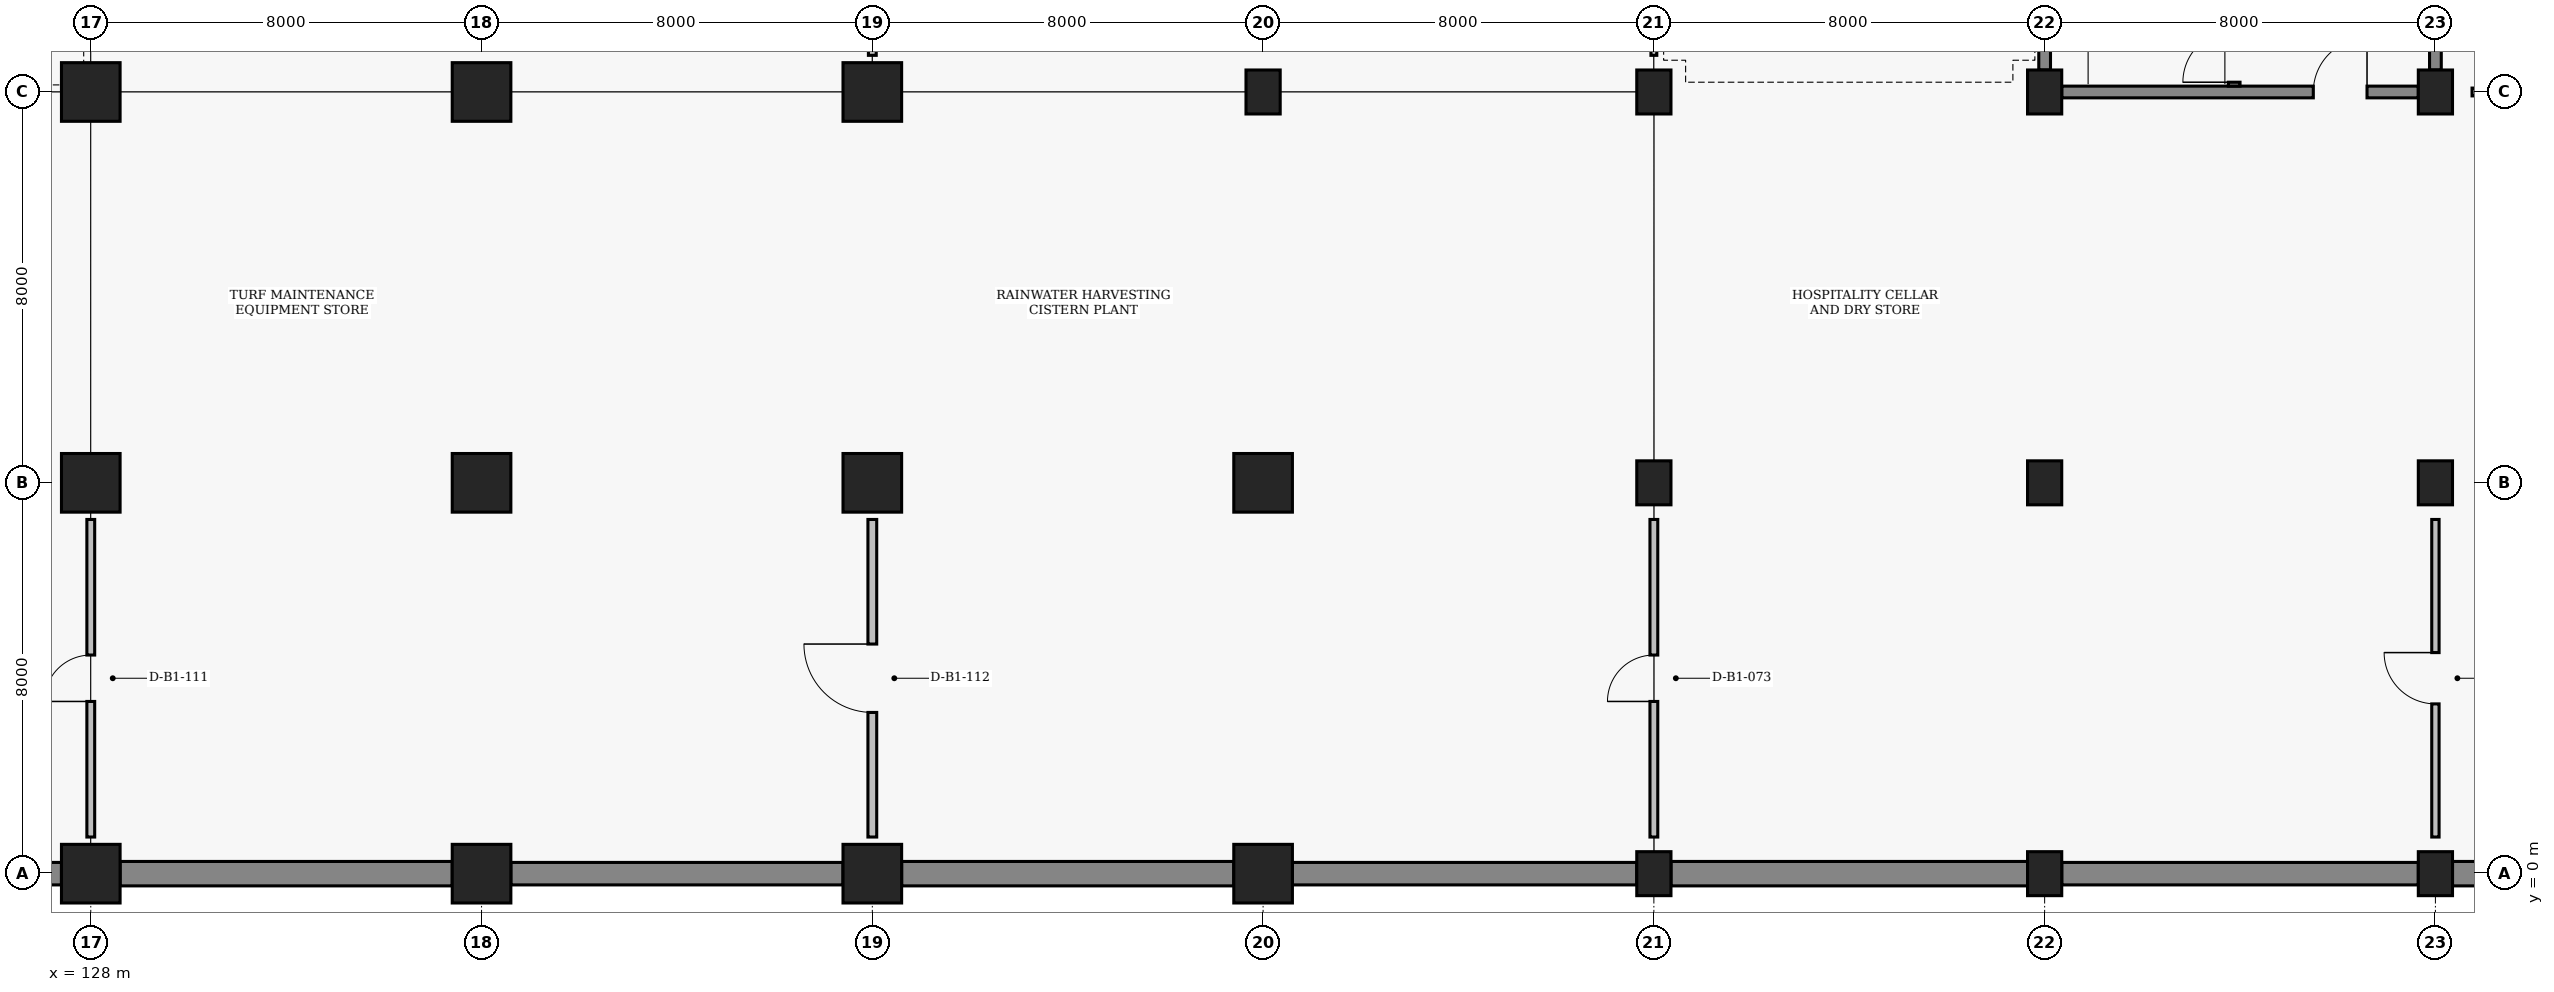
"""IFC4 building model, lengths in metres.
Left out: names, types, materials, properties, quantities, classifications, styles, units other than length and angle.
Written with IfcOpenShell. Run it as: python <this file> out.ifc"""

import sys

from ifc_helpers import new_model, si_unit, direction, frame, frame_2d, origin, origin_2d, place, context, subcontext, project, spatial, rectangle, extrude, element, fill, save


model = new_model("IFC4")
c1 = context("Model", 3, precision=1e-05, world=origin(), true_north=direction((0.0, 1.0)))
c2 = subcontext(c1, "Body", "Model", "MODEL_VIEW")
j1 = project(units=[si_unit("LENGTHUNIT", "METRE"), si_unit("PLANEANGLEUNIT", "RADIAN")], contexts=[c1])
p1 = place(None, origin())
s1 = spatial("IfcSite", under=j1, at=p1, CompositionType="ELEMENT")
p2 = place(p1, origin())
s2 = spatial("IfcBuilding", under=s1, at=p2, CompositionType="ELEMENT")
p3 = place(p2, frame((0.0, 0.0, -5.4)))
s3 = spatial("IfcBuildingStorey", under=s2, at=p3, CompositionType="ELEMENT", Elevation=-5.4)
for number, where, z_axis, x_axis in (
    (1, (128.0, 0.0, 0.0), (0.0, 0.0, 1.0), (1.0, 0.0, 0.0)),
    (2, (128.0, 8.0, 0.0), (0.0, 0.0, 1.0), (1.0, 0.0, 0.0)),
    (3, (128.0, 16.0, 0.0), (0.0, 0.0, 1.0), (1.0, 0.0, 0.0)),
    (4, (136.0, 0.0, 0.0), (0.0, 0.0, 1.0), (1.0, 0.0, 0.0)),
    (5, (136.0, 8.0, 0.0), (0.0, 0.0, 1.0), (1.0, 0.0, 0.0)),
    (6, (136.0, 16.0, 0.0), (0.0, 0.0, 1.0), (1.0, 0.0, 0.0)),
    (7, (144.0, 0.0, 0.0), (0.0, 0.0, 1.0), (1.0, 0.0, 0.0)),
    (8, (144.0, 8.0, 0.0), (0.0, 0.0, 1.0), (1.0, 0.0, 0.0)),
    (9, (144.0, 16.0, 0.0), (0.0, 0.0, 1.0), (1.0, 0.0, 0.0)),
    (10, (152.0, 0.0, 0.0), (0.0, 0.0, 1.0), (1.0, 0.0, 0.0)),
    (11, (152.0, 8.0, 0.0), (0.0, 0.0, 1.0), (1.0, 0.0, 0.0)),
):
    element("IfcColumn", number, at=place(p3, frame(where, z_axis=z_axis, x_axis=x_axis)), inside=s3, PredefinedType="COLUMN", context=c2, shape_type="SweptSolid", body=[
        extrude(rectangle(XDim=1.2, YDim=1.2, at=origin_2d()), origin(), (0.0, 0.0, 1.0), 5.4),
    ])
for number, where, z_axis, x_axis in (
    (12, (152.0, 16.0, 0.0), (0.0, 0.0, 1.0), (1.0, 0.0, 0.0)),
    (13, (160.0, 0.0, 0.0), (0.0, 0.0, 1.0), (1.0, 0.0, 0.0)),
    (14, (160.0, 8.0, 0.0), (0.0, 0.0, 1.0), (1.0, 0.0, 0.0)),
    (15, (160.0, 16.0, 0.0), (0.0, 0.0, 1.0), (1.0, 0.0, 0.0)),
    (16, (168.0, 0.0, 0.0), (0.0, 0.0, 1.0), (1.0, 0.0, 0.0)),
    (17, (168.0, 8.0, 0.0), (0.0, 0.0, 1.0), (1.0, 0.0, 0.0)),
    (18, (168.0, 16.0, 0.0), (0.0, 0.0, 1.0), (1.0, 0.0, 0.0)),
    (19, (176.0, 0.0, 0.0), (0.0, 0.0, 1.0), (1.0, 0.0, 0.0)),
    (20, (176.0, 8.0, 0.0), (0.0, 0.0, 1.0), (1.0, 0.0, 0.0)),
    (21, (176.0, 16.0, 0.0), (0.0, 0.0, 1.0), (1.0, 0.0, 0.0)),
):
    element("IfcColumn", number, at=place(p3, frame(where, z_axis=z_axis, x_axis=x_axis)), inside=s3, PredefinedType="COLUMN", context=c2, shape_type="SweptSolid", body=[
        extrude(rectangle(XDim=0.7, YDim=0.9, at=origin_2d()), origin(), (0.0, 0.0, 1.0), 5.4),
    ])
p4 = place(p3, frame((120.6, 0.0, 0.0), z_axis=(0.0, 0.0, 1.0), x_axis=(1.0, 0.0, 0.0)))
e22 = element("IfcWall", 22, at=p4, inside=s3, PredefinedType="STANDARD", context=c2, shape_type="SweptSolid", body=[
    extrude(rectangle(XDim=6.8, YDim=0.46, at=frame_2d((3.4, 0.0))), origin(), (0.0, 0.0, 1.0), 4.29),
])
p5 = place(p3, frame((128.6, 0.0, 0.0), z_axis=(0.0, 0.0, 1.0), x_axis=(1.0, 0.0, 0.0)))
e23 = element("IfcWall", 23, at=p5, inside=s3, PredefinedType="STANDARD", context=c2, shape_type="SweptSolid", body=[
    extrude(rectangle(XDim=6.8, YDim=0.5, at=frame_2d((3.4, 0.0))), origin(), (0.0, 0.0, 1.0), 4.29),
])
p6 = place(p3, frame((136.6, 0.0, 0.0), z_axis=(0.0, 0.0, 1.0), x_axis=(1.0, 0.0, 0.0)))
e24 = element("IfcWall", 24, at=p6, inside=s3, PredefinedType="STANDARD", context=c2, shape_type="SweptSolid", body=[
    extrude(rectangle(XDim=6.8, YDim=0.46, at=frame_2d((3.4, 0.0))), origin(), (0.0, 0.0, 1.0), 4.29),
])
p7 = place(p3, frame((144.6, 0.0, 0.0), z_axis=(0.0, 0.0, 1.0), x_axis=(1.0, 0.0, 0.0)))
e25 = element("IfcWall", 25, at=p7, inside=s3, PredefinedType="STANDARD", context=c2, shape_type="SweptSolid", body=[
    extrude(rectangle(XDim=6.8, YDim=0.5, at=frame_2d((3.4, 0.0))), origin(), (0.0, 0.0, 1.0), 4.29),
])
p8 = place(p3, frame((152.6, 0.0, 0.0), z_axis=(0.0, 0.0, 1.0), x_axis=(1.0, 0.0, 0.0)))
e26 = element("IfcWall", 26, at=p8, inside=s3, PredefinedType="STANDARD", context=c2, shape_type="SweptSolid", body=[
    extrude(rectangle(XDim=7.05, YDim=0.46, at=frame_2d((3.525, 0.0))), origin(), (0.0, 0.0, 1.0), 4.29),
])
p9 = place(p3, frame((160.35, 0.0, 0.0), z_axis=(0.0, 0.0, 1.0), x_axis=(1.0, 0.0, 0.0)))
e27 = element("IfcWall", 27, at=p9, inside=s3, PredefinedType="STANDARD", context=c2, shape_type="SweptSolid", body=[
    extrude(rectangle(XDim=7.3, YDim=0.5, at=frame_2d((3.65, 0.0))), origin(), (0.0, 0.0, 1.0), 4.29),
])
p10 = place(p3, frame((168.35, 0.0, 0.0), z_axis=(0.0, 0.0, 1.0), x_axis=(1.0, 0.0, 0.0)))
e28 = element("IfcWall", 28, at=p10, inside=s3, PredefinedType="STANDARD", context=c2, shape_type="SweptSolid", body=[
    extrude(rectangle(XDim=7.3, YDim=0.46, at=frame_2d((3.65, 0.0))), origin(), (0.0, 0.0, 1.0), 4.34),
])
p11 = place(p3, frame((176.35, 0.0, 0.0), z_axis=(0.0, 0.0, 1.0), x_axis=(1.0, 0.0, 0.0)))
e29 = element("IfcWall", 29, at=p11, inside=s3, PredefinedType="STANDARD", context=c2, shape_type="SweptSolid", body=[
    extrude(rectangle(XDim=7.3, YDim=0.5, at=frame_2d((3.65, 0.0))), origin(), (0.0, 0.0, 1.0), 4.34),
])
p12 = place(p3, frame((168.35, 16.0, 0.0), z_axis=(0.0, 0.0, 1.0), x_axis=(1.0, 0.0, 0.0)))
e30 = element("IfcWall", 30, at=p12, inside=s3, PredefinedType="SHEAR", context=c2, shape_type="SweptSolid", body=[
    extrude(rectangle(XDim=7.3, YDim=0.24, at=frame_2d((3.65, 0.0))), origin(), (0.0, 0.0, 1.0), 4.39),
])
p13 = place(p12, frame((5.15, 0.0, 0.0)))
e31 = element("IfcOpeningElement", 31, at=p13, cuts=e30, PredefinedType="OPENING", context=c2, shape_type="SweptSolid", body=[
    extrude(rectangle(XDim=1.1, YDim=2.2, at=frame_2d((0.55, 1.1))), frame((0.0, 0.13, 0.0), z_axis=(0.0, -1.0, 0.0), x_axis=(1.0, 0.0, 0.0)), (0.0, 0.0, 1.0), 0.26),
])
for number, where, z_axis, x_axis in (
    (32, (168.0, 16.45, 0.0), (0.0, 0.0, 1.0), (0.0, 1.0, 0.0)),
    (33, (176.0, 16.45, 0.0), (0.0, 0.0, 1.0), (0.0, 1.0, 0.0)),
):
    element("IfcWall", number, at=place(p3, frame(where, z_axis=z_axis, x_axis=x_axis)), inside=s3, PredefinedType="SHEAR", context=c2, shape_type="SweptSolid", body=[
        extrude(rectangle(XDim=7.1, YDim=0.24, at=frame_2d((3.55, 0.0))), origin(), (0.0, 0.0, 1.0), 4.39),
    ])
p14 = place(p3, frame((171.88, 16.12, 0.0), z_axis=(0.0, 0.0, 1.0), x_axis=(0.0, 1.0, 0.0)))
e34 = element("IfcWall", 34, at=p14, inside=s3, PredefinedType="SHEAR", context=c2, shape_type="SweptSolid", body=[
    extrude(rectangle(XDim=7.76, YDim=0.24, at=frame_2d((3.88, 0.0))), origin(), (0.0, 0.0, 1.0), 4.59),
])
p15 = place(p14, frame((0.08, 0.0, 0.0)))
e35 = element("IfcOpeningElement", 35, at=p15, cuts=e34, PredefinedType="OPENING", context=c2, shape_type="SweptSolid", body=[
    extrude(rectangle(XDim=1.05, YDim=2.15, at=frame_2d((0.525, 1.075))), frame((0.0, 0.13, 0.0), z_axis=(0.0, -1.0, 0.0), x_axis=(1.0, 0.0, 0.0)), (0.0, 0.0, 1.0), 0.26),
])
p16 = place(p3, frame((144.0, 16.75, 0.0), z_axis=(0.0, 0.0, 1.0), x_axis=(0.0, 1.0, 0.0)))
e36 = element("IfcWall", 36, at=p16, inside=s3, PredefinedType="PARTITIONING", context=c2, shape_type="SweptSolid", body=[
    extrude(rectangle(XDim=6.5, YDim=0.16, at=frame_2d((3.25, 0.0))), origin(), (0.0, 0.0, 1.0), 3.69),
])
p17 = place(p16, frame((2.75, 0.0, 0.0)))
e37 = element("IfcOpeningElement", 37, at=p17, cuts=e36, PredefinedType="OPENING", context=c2, shape_type="SweptSolid", body=[
    extrude(rectangle(XDim=1.0, YDim=2.1, at=frame_2d((0.5, 1.05))), frame((0.0, 0.09, 0.0), z_axis=(0.0, -1.0, 0.0), x_axis=(1.0, 0.0, 0.0)), (0.0, 0.0, 1.0), 0.18),
])
p18 = place(p3, frame((160.0, 0.75, 0.0), z_axis=(0.0, 0.0, 1.0), x_axis=(0.0, 1.0, 0.0)))
e38 = element("IfcWall", 38, at=p18, inside=s3, PredefinedType="PARTITIONING", context=c2, shape_type="SweptSolid", body=[
    extrude(rectangle(XDim=6.5, YDim=0.16, at=frame_2d((3.25, 0.0))), origin(), (0.0, 0.0, 1.0), 3.69),
])
p19 = place(p18, frame((2.775, 0.0, 0.0)))
e39 = element("IfcOpeningElement", 39, at=p19, cuts=e38, PredefinedType="OPENING", context=c2, shape_type="SweptSolid", body=[
    extrude(rectangle(XDim=0.95, YDim=2.1, at=frame_2d((0.475, 1.05))), frame((0.0, 0.09, 0.0), z_axis=(0.0, -1.0, 0.0), x_axis=(1.0, 0.0, 0.0)), (0.0, 0.0, 1.0), 0.18),
])
p20 = place(p3, frame((160.0, 16.75, 0.0), z_axis=(0.0, 0.0, 1.0), x_axis=(0.0, 1.0, 0.0)))
e40 = element("IfcWall", 40, at=p20, inside=s3, PredefinedType="PARTITIONING", context=c2, shape_type="SweptSolid", body=[
    extrude(rectangle(XDim=6.5, YDim=0.12, at=frame_2d((3.25, 0.0))), origin(), (0.0, 0.0, 1.0), 3.64),
])
p21 = place(p20, frame((2.75, 0.0, 0.0)))
e41 = element("IfcOpeningElement", 41, at=p21, cuts=e40, PredefinedType="OPENING", context=c2, shape_type="SweptSolid", body=[
    extrude(rectangle(XDim=1.0, YDim=2.1, at=frame_2d((0.5, 1.05))), frame((0.0, 0.07, 0.0), z_axis=(0.0, -1.0, 0.0), x_axis=(1.0, 0.0, 0.0)), (0.0, 0.0, 1.0), 0.14),
])
p22 = place(p3, frame((176.0, 0.75, 0.0), z_axis=(0.0, 0.0, 1.0), x_axis=(0.0, 1.0, 0.0)))
e42 = element("IfcWall", 42, at=p22, inside=s3, PredefinedType="PARTITIONING", context=c2, shape_type="SweptSolid", body=[
    extrude(rectangle(XDim=6.5, YDim=0.15, at=frame_2d((3.25, 0.0))), origin(), (0.0, 0.0, 1.0), 4.39),
])
p23 = place(p22, frame((2.725, 0.0, 0.0)))
e43 = element("IfcOpeningElement", 43, at=p23, cuts=e42, PredefinedType="OPENING", context=c2, shape_type="SweptSolid", body=[
    extrude(rectangle(XDim=1.05, YDim=2.15, at=frame_2d((0.525, 1.075))), frame((0.0, 0.085, 0.0), z_axis=(0.0, -1.0, 0.0), x_axis=(1.0, 0.0, 0.0)), (0.0, 0.0, 1.0), 0.17),
])
p24 = place(p3, frame((176.75, 16.0, 0.0), z_axis=(0.0, 0.0, 1.0), x_axis=(1.0, 0.0, 0.0)))
e44 = element("IfcWall", 44, at=p24, inside=s3, PredefinedType="PARTITIONING", context=c2, shape_type="SweptSolid", body=[
    extrude(rectangle(XDim=6.5, YDim=0.16, at=frame_2d((3.25, 0.0))), origin(), (0.0, 0.0, 1.0), 4.49),
])
p25 = place(p24, frame((2.775, 0.0, 0.0)))
e45 = element("IfcOpeningElement", 45, at=p25, cuts=e44, PredefinedType="OPENING", context=c2, shape_type="SweptSolid", body=[
    extrude(rectangle(XDim=0.95, YDim=2.1, at=frame_2d((0.475, 1.05))), frame((0.0, 0.09, 0.0), z_axis=(0.0, -1.0, 0.0), x_axis=(1.0, 0.0, 0.0)), (0.0, 0.0, 1.0), 0.18),
])
p26 = place(p3, frame((128.0, 0.75, 0.0), z_axis=(0.0, 0.0, 1.0), x_axis=(0.0, 1.0, 0.0)))
e46 = element("IfcWall", 46, at=p26, inside=s3, PredefinedType="PARTITIONING", context=c2, shape_type="SweptSolid", body=[
    extrude(rectangle(XDim=6.5, YDim=0.16, at=frame_2d((3.25, 0.0))), origin(), (0.0, 0.0, 1.0), 4.34),
])
p27 = place(p26, frame((2.775, 0.0, 0.0)))
e47 = element("IfcOpeningElement", 47, at=p27, cuts=e46, PredefinedType="OPENING", context=c2, shape_type="SweptSolid", body=[
    extrude(rectangle(XDim=0.95, YDim=2.1, at=frame_2d((0.475, 1.05))), frame((0.0, 0.09, 0.0), z_axis=(0.0, -1.0, 0.0), x_axis=(1.0, 0.0, 0.0)), (0.0, 0.0, 1.0), 0.18),
])
p28 = place(p3, frame((144.0, 0.75, 0.0), z_axis=(0.0, 0.0, 1.0), x_axis=(0.0, 1.0, 0.0)))
e48 = element("IfcWall", 48, at=p28, inside=s3, PredefinedType="PARTITIONING", context=c2, shape_type="SweptSolid", body=[
    extrude(rectangle(XDim=6.5, YDim=0.18, at=frame_2d((3.25, 0.0))), origin(), (0.0, 0.0, 1.0), 4.34),
])
p29 = place(p28, frame((2.55, 0.0, 0.0)))
e49 = element("IfcOpeningElement", 49, at=p29, cuts=e48, PredefinedType="OPENING", context=c2, shape_type="SweptSolid", body=[
    extrude(rectangle(XDim=1.4, YDim=2.2, at=frame_2d((0.7, 1.1))), frame((0.0, 0.1, 0.0), z_axis=(0.0, -1.0, 0.0), x_axis=(1.0, 0.0, 0.0)), (0.0, 0.0, 1.0), 0.2),
])
p30 = place(p13, origin())
e50 = element("IfcDoor", 50, at=p30, inside=s3, OperationType="SINGLE_SWING_RIGHT", PredefinedType="DOOR", context=c2, shape_type="SweptSolid", body=[
    extrude(rectangle(XDim=1.1, YDim=2.2, at=frame_2d((0.55, 1.1))), frame((0.0, 0.025, 0.0), z_axis=(0.0, -1.0, 0.0), x_axis=(1.0, 0.0, 0.0)), (0.0, 0.0, 1.0), 0.05),
])
fill(e31, e50)
p31 = place(p15, origin())
e51 = element("IfcDoor", 51, at=p31, inside=s3, OperationType="SINGLE_SWING_LEFT", PredefinedType="DOOR", context=c2, shape_type="SweptSolid", body=[
    extrude(rectangle(XDim=1.05, YDim=2.15, at=frame_2d((0.525, 1.075))), frame((0.0, 0.025, 0.0), z_axis=(0.0, -1.0, 0.0), x_axis=(1.0, 0.0, 0.0)), (0.0, 0.0, 1.0), 0.05),
])
fill(e35, e51)
p32 = place(p19, origin())
e52 = element("IfcDoor", 52, at=p32, inside=s3, OperationType="SINGLE_SWING_LEFT", PredefinedType="DOOR", context=c2, shape_type="SweptSolid", body=[
    extrude(rectangle(XDim=0.95, YDim=2.1, at=frame_2d((0.475, 1.05))), frame((0.0, 0.025, 0.0), z_axis=(0.0, -1.0, 0.0), x_axis=(1.0, 0.0, 0.0)), (0.0, 0.0, 1.0), 0.05),
])
fill(e39, e52)
p33 = place(p23, origin())
e53 = element("IfcDoor", 53, at=p33, inside=s3, OperationType="SINGLE_SWING_RIGHT", PredefinedType="DOOR", context=c2, shape_type="SweptSolid", body=[
    extrude(rectangle(XDim=1.05, YDim=2.15, at=frame_2d((0.525, 1.075))), frame((0.0, 0.025, 0.0), z_axis=(0.0, -1.0, 0.0), x_axis=(1.0, 0.0, 0.0)), (0.0, 0.0, 1.0), 0.05),
])
fill(e43, e53)
p34 = place(p27, origin())
e54 = element("IfcDoor", 54, at=p34, inside=s3, OperationType="SINGLE_SWING_LEFT", PredefinedType="DOOR", context=c2, shape_type="SweptSolid", body=[
    extrude(rectangle(XDim=0.95, YDim=2.1, at=frame_2d((0.475, 1.05))), frame((0.0, 0.025, 0.0), z_axis=(0.0, -1.0, 0.0), x_axis=(1.0, 0.0, 0.0)), (0.0, 0.0, 1.0), 0.05),
])
fill(e47, e54)
p35 = place(p29, origin())
e55 = element("IfcDoor", 55, at=p35, inside=s3, OperationType="SINGLE_SWING_RIGHT", PredefinedType="DOOR", context=c2, shape_type="SweptSolid", body=[
    extrude(rectangle(XDim=1.4, YDim=2.2, at=frame_2d((0.7, 1.1))), frame((0.0, 0.025, 0.0), z_axis=(0.0, -1.0, 0.0), x_axis=(1.0, 0.0, 0.0)), (0.0, 0.0, 1.0), 0.05),
])
fill(e49, e55)
save(model, sys.argv[1])
